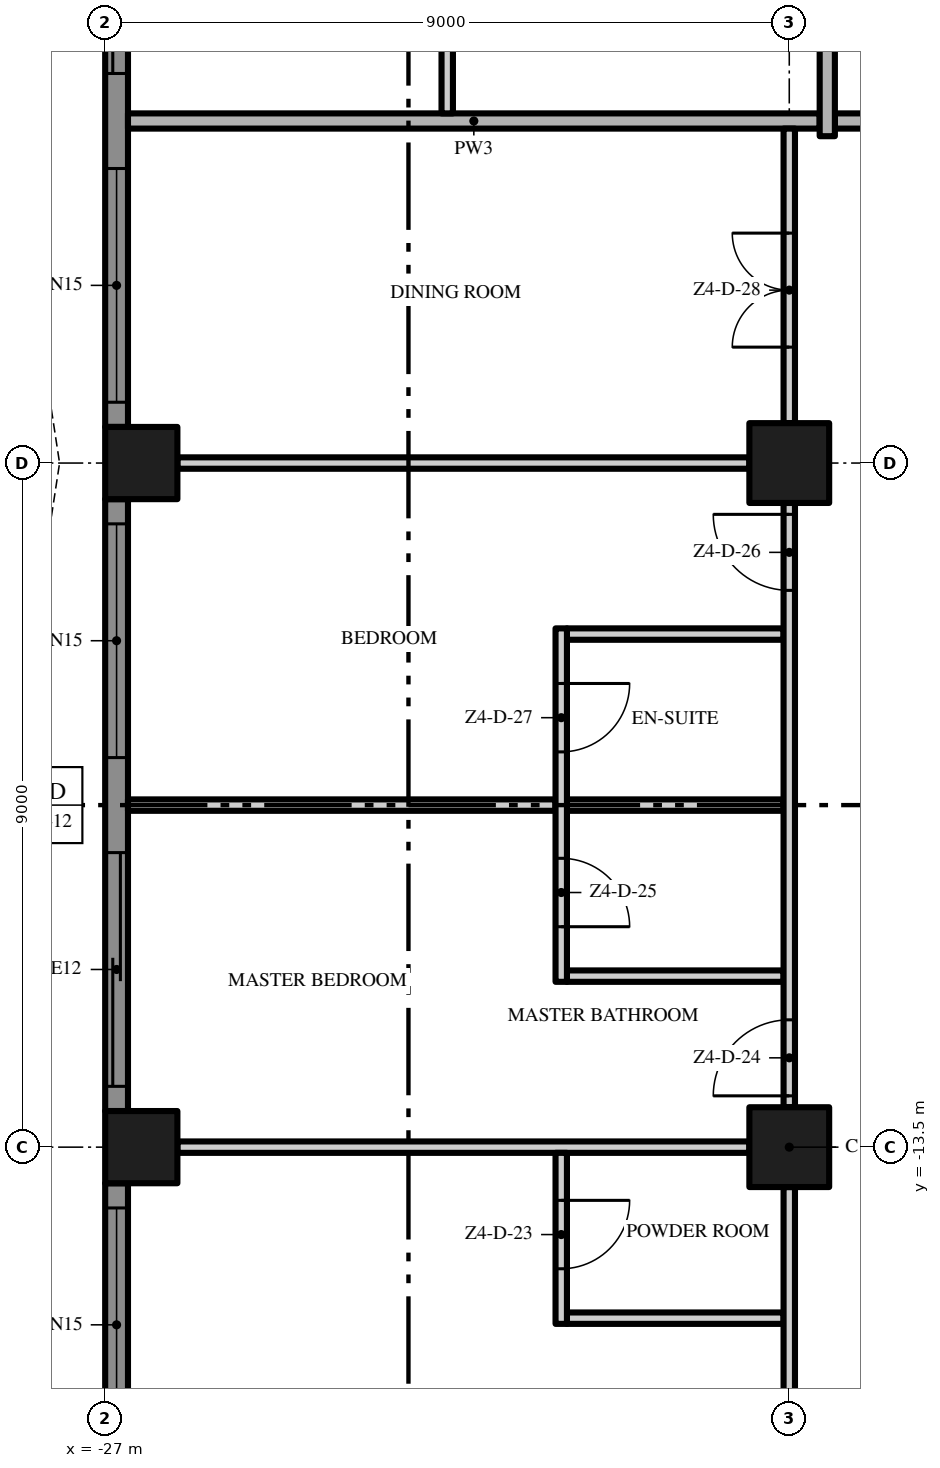
"""IFC4 building model, lengths in metres.
Left out: names, types, materials, properties, quantities, classifications, styles, units other than length and angle.
Written with IfcOpenShell. Run it as: python <this file> out.ifc"""

import sys

from ifc_helpers import new_model, si_unit, direction, frame, frame_2d, origin, origin_2d, place, context, subcontext, project, spatial, polyline, rectangle, outline, extrude, element, fill, save


model = new_model("IFC4")
c1 = context("Model", 3, precision=1e-05, world=origin(), true_north=direction((0.0, 1.0)))
c2 = subcontext(c1, "Body", "Model", "MODEL_VIEW")
j1 = project(units=[si_unit("LENGTHUNIT", "METRE"), si_unit("PLANEANGLEUNIT", "RADIAN")], contexts=[c1])
p1 = place(None, origin())
s1 = spatial("IfcSite", under=j1, at=p1, CompositionType="ELEMENT")
p2 = place(p1, origin())
s2 = spatial("IfcBuilding", under=s1, at=p2, CompositionType="ELEMENT")
p3 = place(p2, frame((0.0, 0.0, 218.6)))
s3 = spatial("IfcBuildingStorey", under=s2, at=p3, CompositionType="ELEMENT", Elevation=218.6)
for number, where, z_axis, x_axis in (
    (1, (-18.0, -13.5, 0.0), (0.0, 0.0, 1.0), (1.0, 0.0, 0.0)),
    (2, (-18.0, -4.5, 0.0), (0.0, 0.0, 1.0), (1.0, 0.0, 0.0)),
):
    element("IfcColumn", number, at=place(p3, frame(where, z_axis=z_axis, x_axis=x_axis)), inside=s3, PredefinedType="COLUMN", context=c2, shape_type="SweptSolid", body=[
        extrude(rectangle(XDim=1.05, YDim=1.05, at=origin_2d()), origin(), (0.0, 0.0, 1.0), 3.5),
    ])
for number, where, z_axis, x_axis in (
    (3, (-26.525, -13.5, 0.0), (0.0, 0.0, 1.0), (1.0, 0.0, 0.0)),
    (4, (-26.525, -4.5, 0.0), (0.0, 0.0, 1.0), (1.0, 0.0, 0.0)),
):
    element("IfcColumn", number, at=place(p3, frame(where, z_axis=z_axis, x_axis=x_axis)), inside=s3, PredefinedType="COLUMN", context=c2, shape_type="SweptSolid", body=[
        extrude(rectangle(XDim=0.95, YDim=0.95, at=origin_2d()), origin(), (0.0, 0.0, 1.0), 3.5),
    ])
p4 = place(p3, frame((-26.85, -4.025, 0.0), z_axis=(0.0, 0.0, 1.0), x_axis=(0.0, 1.0, 0.0)))
e5 = element("IfcWall", 5, at=p4, inside=s3, PredefinedType="SOLIDWALL", context=c2, shape_type="SweptSolid", body=[
    extrude(rectangle(XDim=8.05, YDim=0.3, at=frame_2d((4.025, 0.0))), origin(), (0.0, 0.0, 1.0), 3.5),
])
p5 = place(p4, frame((4.65, 0.0, 0.0)))
e6 = element("IfcOpeningElement", 6, at=p5, cuts=e5, PredefinedType="OPENING", context=c2, shape_type="SweptSolid", body=[
    extrude(rectangle(XDim=3.075, YDim=2.4, at=frame_2d((1.538, 1.2))), frame((0.0, 0.16, 0.0), z_axis=(0.0, -1.0, 0.0), x_axis=(1.0, 0.0, 0.0)), (0.0, 0.0, 1.0), 0.32),
])
p6 = place(p4, frame((0.325, 0.0, 0.45)))
e7 = element("IfcOpeningElement", 7, at=p6, cuts=e5, PredefinedType="OPENING", context=c2, shape_type="SweptSolid", body=[
    extrude(rectangle(XDim=3.075, YDim=2.65, at=frame_2d((1.538, 1.325))), frame((0.0, 0.16, 0.0), z_axis=(0.0, -1.0, 0.0), x_axis=(1.0, 0.0, 0.0)), (0.0, 0.0, 1.0), 0.32),
])
p7 = place(p3, frame((-26.85, -13.025, 0.0), z_axis=(0.0, 0.0, 1.0), x_axis=(0.0, 1.0, 0.0)))
e8 = element("IfcWall", 8, at=p7, inside=s3, PredefinedType="SOLIDWALL", context=c2, shape_type="SweptSolid", body=[
    extrude(rectangle(XDim=8.05, YDim=0.3, at=frame_2d((4.025, 0.0))), origin(), (0.0, 0.0, 1.0), 3.5),
])
p8 = place(p7, frame((4.65, 0.0, 0.45)))
e9 = element("IfcOpeningElement", 9, at=p8, cuts=e8, PredefinedType="OPENING", context=c2, shape_type="SweptSolid", body=[
    extrude(rectangle(XDim=3.075, YDim=2.65, at=frame_2d((1.538, 1.325))), frame((0.0, 0.16, 0.0), z_axis=(0.0, -1.0, 0.0), x_axis=(1.0, 0.0, 0.0)), (0.0, 0.0, 1.0), 0.32),
])
p9 = place(p7, frame((0.325, 0.0, 0.0)))
e10 = element("IfcOpeningElement", 10, at=p9, cuts=e8, PredefinedType="OPENING", context=c2, shape_type="SweptSolid", body=[
    extrude(rectangle(XDim=3.075, YDim=2.4, at=frame_2d((1.538, 1.2))), frame((0.0, 0.16, 0.0), z_axis=(0.0, -1.0, 0.0), x_axis=(1.0, 0.0, 0.0)), (0.0, 0.0, 1.0), 0.32),
])
p10 = place(p3, frame((-26.85, -18.0, 0.0), z_axis=(0.0, 0.0, 1.0), x_axis=(0.0, 1.0, 0.0)))
e11 = element("IfcWall", 11, at=p10, inside=s3, PredefinedType="SOLIDWALL", context=c2, shape_type="SweptSolid", body=[
    extrude(rectangle(XDim=4.025, YDim=0.3, at=frame_2d((2.013, 0.0))), origin(), (0.0, 0.0, 1.0), 3.5),
])
p11 = place(p10, frame((0.625, 0.0, 0.45)))
e12 = element("IfcOpeningElement", 12, at=p11, cuts=e11, PredefinedType="OPENING", context=c2, shape_type="SweptSolid", body=[
    extrude(rectangle(XDim=3.075, YDim=2.65, at=frame_2d((1.538, 1.325))), frame((0.0, 0.16, 0.0), z_axis=(0.0, -1.0, 0.0), x_axis=(1.0, 0.0, 0.0)), (0.0, 0.0, 1.0), 0.32),
])
p12 = place(p3, origin())
e13 = element("IfcWall", 13, at=p12, inside=s3, PredefinedType="USERDEFINED", context=c2, shape_type="SweptSolid", body=[
    extrude(outline(polyline([(-30.0, 18.0), (-29.771, 16.5), (-29.171, 15.0), (-28.429, 13.5), (-27.829, 12.0), (-27.6, 10.5), (-27.829, 9.0), (-28.429, 7.5), (-29.171, 6.0), (-29.771, 4.5), (-30.0, 3.0), (-29.771, 1.5), (-29.171, 0.0), (-28.429, -1.5), (-27.829, -3.0), (-27.6, -4.5), (-27.829, -6.0), (-28.429, -7.5), (-29.171, -9.0), (-29.771, -10.5), (-30.0, -12.0), (-29.771, -13.5), (-29.171, -15.0), (-28.429, -16.5), (-27.829, -18.0), (-27.597, -17.907), (-28.201, -16.398), (-28.942, -14.898), (-29.528, -13.434), (-29.747, -12.0), (-29.528, -10.566), (-28.942, -9.102), (-28.201, -7.602), (-27.586, -6.066), (-27.347, -4.5), (-27.586, -2.934), (-28.201, -1.398), (-28.942, 0.102), (-29.528, 1.566), (-29.747, 3.0), (-29.528, 4.434), (-28.942, 5.898), (-28.201, 7.398), (-27.586, 8.934), (-27.347, 10.5), (-27.586, 12.066), (-28.201, 13.602), (-28.942, 15.102), (-29.528, 16.566), (-29.753, 18.038), (-30.0, 18.0)])), origin(), (0.0, 0.0, 1.0), 0.9),
])
p13 = place(p3, frame((-20.925, -15.75, 0.0), z_axis=(0.0, 0.0, 1.0), x_axis=(1.0, 0.0, 0.0)))
e14 = element("IfcWall", 14, at=p13, inside=s3, PredefinedType="PARTITIONING", context=c2, shape_type="SweptSolid", body=[
    extrude(rectangle(XDim=2.85, YDim=0.15, at=frame_2d((1.425, 0.0))), origin(), (0.0, 0.0, 1.0), 3.5),
])
p14 = place(p3, frame((-26.05, -13.5, 0.0), z_axis=(0.0, 0.0, 1.0), x_axis=(1.0, 0.0, 0.0)))
e15 = element("IfcWall", 15, at=p14, inside=s3, PredefinedType="PARTITIONING", context=c2, shape_type="SweptSolid", body=[
    extrude(rectangle(XDim=7.525, YDim=0.15, at=frame_2d((3.763, 0.0))), origin(), (0.0, 0.0, 1.0), 3.5),
])
p15 = place(p3, frame((-20.925, -11.25, 0.0), z_axis=(0.0, 0.0, 1.0), x_axis=(1.0, 0.0, 0.0)))
e16 = element("IfcWall", 16, at=p15, inside=s3, PredefinedType="PARTITIONING", context=c2, shape_type="SweptSolid", body=[
    extrude(rectangle(XDim=2.85, YDim=0.15, at=frame_2d((1.425, 0.0))), origin(), (0.0, 0.0, 1.0), 3.5),
])
p16 = place(p3, frame((-26.7, -9.0, 0.0), z_axis=(0.0, 0.0, 1.0), x_axis=(1.0, 0.0, 0.0)))
e17 = element("IfcWall", 17, at=p16, inside=s3, PredefinedType="PARTITIONING", context=c2, shape_type="SweptSolid", body=[
    extrude(rectangle(XDim=5.625, YDim=0.15, at=frame_2d((2.812, 0.0))), origin(), (0.0, 0.0, 1.0), 3.5),
])
for number, where, z_axis, x_axis in (
    (18, (-20.925, -9.0, 0.0), (0.0, 0.0, 1.0), (1.0, 0.0, 0.0)),
    (19, (-20.925, -6.75, 0.0), (0.0, 0.0, 1.0), (1.0, 0.0, 0.0)),
):
    element("IfcWall", number, at=place(p3, frame(where, z_axis=z_axis, x_axis=x_axis)), inside=s3, PredefinedType="PARTITIONING", context=c2, shape_type="SweptSolid", body=[
        extrude(rectangle(XDim=2.85, YDim=0.15, at=frame_2d((1.425, 0.0))), origin(), (0.0, 0.0, 1.0), 3.5),
    ])
p17 = place(p3, frame((-26.05, -4.5, 0.0), z_axis=(0.0, 0.0, 1.0), x_axis=(1.0, 0.0, 0.0)))
e20 = element("IfcWall", 20, at=p17, inside=s3, PredefinedType="PARTITIONING", context=c2, shape_type="SweptSolid", body=[
    extrude(rectangle(XDim=7.525, YDim=0.15, at=frame_2d((3.763, 0.0))), origin(), (0.0, 0.0, 1.0), 3.5),
])
p18 = place(p3, frame((-17.4, 0.0, 0.0), z_axis=(0.0, 0.0, 1.0), x_axis=(1.0, 0.0, 0.0)))
e21 = element("IfcWall", 21, at=p18, inside=s3, PredefinedType="PARTITIONING", context=c2, shape_type="SweptSolid", body=[
    extrude(rectangle(XDim=12.8, YDim=0.2, at=frame_2d((6.4, 0.0))), origin(), (0.0, 0.0, 1.0), 3.5),
])
p19 = place(p3, frame((-26.7, 0.0, 0.0), z_axis=(0.0, 0.0, 1.0), x_axis=(1.0, 0.0, 0.0)))
e22 = element("IfcWall", 22, at=p19, inside=s3, PredefinedType="PARTITIONING", context=c2, shape_type="SweptSolid", body=[
    extrude(rectangle(XDim=9.1, YDim=0.2, at=frame_2d((4.55, 0.0))), origin(), (0.0, 0.0, 1.0), 3.5),
])
p20 = place(p3, frame((-22.5, 0.1, 0.0), z_axis=(0.0, 0.0, 1.0), x_axis=(0.0, 1.0, 0.0)))
e23 = element("IfcWall", 23, at=p20, inside=s3, PredefinedType="PARTITIONING", context=c2, shape_type="SweptSolid", body=[
    extrude(rectangle(XDim=17.425, YDim=0.15, at=frame_2d((8.713, 0.0))), origin(), (0.0, 0.0, 1.0), 3.5),
])
p21 = place(p20, frame((1.65, 0.0, 0.0)))
e24 = element("IfcOpeningElement", 24, at=p21, cuts=e23, PredefinedType="OPENING", context=c2, shape_type="SweptSolid", body=[
    extrude(rectangle(XDim=1.0, YDim=2.4, at=frame_2d((0.5, 1.2))), frame((0.0, 0.085, 0.0), z_axis=(0.0, -1.0, 0.0), x_axis=(1.0, 0.0, 0.0)), (0.0, 0.0, 1.0), 0.17),
])
p22 = place(p20, frame((7.25, 0.0, 0.0)))
e25 = element("IfcOpeningElement", 25, at=p22, cuts=e23, PredefinedType="OPENING", context=c2, shape_type="SweptSolid", body=[
    extrude(rectangle(XDim=1.0, YDim=2.4, at=frame_2d((0.5, 1.2))), frame((0.0, 0.085, 0.0), z_axis=(0.0, -1.0, 0.0), x_axis=(1.0, 0.0, 0.0)), (0.0, 0.0, 1.0), 0.17),
])
p23 = place(p20, frame((11.4, 0.0, 0.0)))
e26 = element("IfcOpeningElement", 26, at=p23, cuts=e23, PredefinedType="OPENING", context=c2, shape_type="SweptSolid", body=[
    extrude(rectangle(XDim=1.8, YDim=2.4, at=frame_2d((0.9, 1.2))), frame((0.0, 0.085, 0.0), z_axis=(0.0, -1.0, 0.0), x_axis=(1.0, 0.0, 0.0)), (0.0, 0.0, 1.0), 0.17),
])
p24 = place(p3, frame((-21.0, -13.575, 0.0), z_axis=(0.0, 0.0, 1.0), x_axis=(0.0, -1.0, 0.0)))
e27 = element("IfcWall", 27, at=p24, inside=s3, PredefinedType="PARTITIONING", context=c2, shape_type="SweptSolid", body=[
    extrude(rectangle(XDim=2.25, YDim=0.15, at=frame_2d((1.125, 0.0))), origin(), (0.0, 0.0, 1.0), 3.5),
])
p25 = place(p24, frame((0.625, 0.0, 0.0)))
e28 = element("IfcOpeningElement", 28, at=p25, cuts=e27, PredefinedType="OPENING", context=c2, shape_type="SweptSolid", body=[
    extrude(rectangle(XDim=0.9, YDim=2.1, at=frame_2d((0.45, 1.05))), frame((0.0, 0.085, 0.0), z_axis=(0.0, -1.0, 0.0), x_axis=(1.0, 0.0, 0.0)), (0.0, 0.0, 1.0), 0.17),
])
p26 = place(p3, frame((-21.0, -6.675, 0.0), z_axis=(0.0, 0.0, 1.0), x_axis=(0.0, -1.0, 0.0)))
e29 = element("IfcWall", 29, at=p26, inside=s3, PredefinedType="PARTITIONING", context=c2, shape_type="SweptSolid", body=[
    extrude(rectangle(XDim=4.65, YDim=0.15, at=frame_2d((2.325, 0.0))), origin(), (0.0, 0.0, 1.0), 3.5),
])
p27 = place(p26, frame((3.025, 0.0, 0.0)))
e30 = element("IfcOpeningElement", 30, at=p27, cuts=e29, PredefinedType="OPENING", context=c2, shape_type="SweptSolid", body=[
    extrude(rectangle(XDim=0.9, YDim=2.1, at=frame_2d((0.45, 1.05))), frame((0.0, 0.085, 0.0), z_axis=(0.0, -1.0, 0.0), x_axis=(1.0, 0.0, 0.0)), (0.0, 0.0, 1.0), 0.17),
])
p28 = place(p26, frame((0.725, 0.0, 0.0)))
e31 = element("IfcOpeningElement", 31, at=p28, cuts=e29, PredefinedType="OPENING", context=c2, shape_type="SweptSolid", body=[
    extrude(rectangle(XDim=0.9, YDim=2.1, at=frame_2d((0.45, 1.05))), frame((0.0, 0.085, 0.0), z_axis=(0.0, -1.0, 0.0), x_axis=(1.0, 0.0, 0.0)), (0.0, 0.0, 1.0), 0.17),
])
p29 = place(p3, frame((-18.0, -21.55, 0.0), z_axis=(0.0, 0.0, 1.0), x_axis=(0.0, 1.0, 0.0)))
e32 = element("IfcWall", 32, at=p29, inside=s3, PredefinedType="PARTITIONING", context=c2, shape_type="SweptSolid", body=[
    extrude(rectangle(XDim=7.525, YDim=0.15, at=frame_2d((3.763, 0.0))), origin(), (0.0, 0.0, 1.0), 3.5),
])
p30 = place(p29, frame((1.5, 0.0, 0.0)))
e33 = element("IfcOpeningElement", 33, at=p30, cuts=e32, PredefinedType="OPENING", context=c2, shape_type="SweptSolid", body=[
    extrude(rectangle(XDim=1.8, YDim=2.4, at=frame_2d((0.9, 1.2))), frame((0.0, 0.085, 0.0), z_axis=(0.0, -1.0, 0.0), x_axis=(1.0, 0.0, 0.0)), (0.0, 0.0, 1.0), 0.17),
])
p31 = place(p3, frame((-18.0, -12.975, 0.0), z_axis=(0.0, 0.0, 1.0), x_axis=(0.0, 1.0, 0.0)))
e34 = element("IfcWall", 34, at=p31, inside=s3, PredefinedType="PARTITIONING", context=c2, shape_type="SweptSolid", body=[
    extrude(rectangle(XDim=7.95, YDim=0.15, at=frame_2d((3.975, 0.0))), origin(), (0.0, 0.0, 1.0), 3.5),
])
p32 = place(p31, frame((0.15, 0.0, 0.0)))
e35 = element("IfcOpeningElement", 35, at=p32, cuts=e34, PredefinedType="OPENING", context=c2, shape_type="SweptSolid", body=[
    extrude(rectangle(XDim=1.0, YDim=2.4, at=frame_2d((0.5, 1.2))), frame((0.0, 0.085, 0.0), z_axis=(0.0, -1.0, 0.0), x_axis=(1.0, 0.0, 0.0)), (0.0, 0.0, 1.0), 0.17),
])
p33 = place(p31, frame((6.8, 0.0, 0.0)))
e36 = element("IfcOpeningElement", 36, at=p33, cuts=e34, PredefinedType="OPENING", context=c2, shape_type="SweptSolid", body=[
    extrude(rectangle(XDim=1.0, YDim=2.4, at=frame_2d((0.5, 1.2))), frame((0.0, 0.085, 0.0), z_axis=(0.0, -1.0, 0.0), x_axis=(1.0, 0.0, 0.0)), (0.0, 0.0, 1.0), 0.17),
])
p34 = place(p3, frame((-18.0, -3.975, 0.0), z_axis=(0.0, 0.0, 1.0), x_axis=(0.0, 1.0, 0.0)))
e37 = element("IfcWall", 37, at=p34, inside=s3, PredefinedType="PARTITIONING", context=c2, shape_type="SweptSolid", body=[
    extrude(rectangle(XDim=3.875, YDim=0.15, at=frame_2d((1.938, 0.0))), origin(), (0.0, 0.0, 1.0), 3.5),
])
p35 = place(p34, frame((1.0, 0.0, 0.0)))
e38 = element("IfcOpeningElement", 38, at=p35, cuts=e37, PredefinedType="OPENING", context=c2, shape_type="SweptSolid", body=[
    extrude(rectangle(XDim=1.5, YDim=2.4, at=frame_2d((0.75, 1.2))), frame((0.0, 0.085, 0.0), z_axis=(0.0, -1.0, 0.0), x_axis=(1.0, 0.0, 0.0)), (0.0, 0.0, 1.0), 0.17),
])
p36 = place(p3, frame((-17.5, -0.2, 0.0), z_axis=(0.0, 0.0, 1.0), x_axis=(0.0, 1.0, 0.0)))
e39 = element("IfcWall", 39, at=p36, inside=s3, PredefinedType="PARTITIONING", context=c2, shape_type="SweptSolid", body=[
    extrude(rectangle(XDim=4.175, YDim=0.2, at=frame_2d((2.087, 0.0))), origin(), (0.0, 0.0, 1.0), 3.5),
])
p37 = place(p5, origin())
e40 = element("IfcDoor", 40, at=p37, inside=s3, OperationType="SINGLE_SWING_LEFT", PredefinedType="DOOR", context=c2, shape_type="SweptSolid", body=[
    extrude(rectangle(XDim=3.075, YDim=2.4, at=frame_2d((1.538, 1.2))), frame((0.0, 0.025, 0.0), z_axis=(0.0, -1.0, 0.0), x_axis=(1.0, 0.0, 0.0)), (0.0, 0.0, 1.0), 0.05),
])
fill(e6, e40)
p38 = place(p6, origin())
e41 = element("IfcWindow", 41, at=p38, inside=s3, PartitioningType="SINGLE_PANEL", PredefinedType="WINDOW", context=c2, shape_type="SweptSolid", body=[
    extrude(rectangle(XDim=3.075, YDim=2.65, at=frame_2d((1.538, 1.325))), frame((0.0, 0.03, 0.0), z_axis=(0.0, -1.0, 0.0), x_axis=(1.0, 0.0, 0.0)), (0.0, 0.0, 1.0), 0.06),
])
fill(e7, e41)
p39 = place(p8, origin())
e42 = element("IfcWindow", 42, at=p39, inside=s3, PartitioningType="SINGLE_PANEL", PredefinedType="WINDOW", context=c2, shape_type="SweptSolid", body=[
    extrude(rectangle(XDim=3.075, YDim=2.65, at=frame_2d((1.538, 1.325))), frame((0.0, 0.03, 0.0), z_axis=(0.0, -1.0, 0.0), x_axis=(1.0, 0.0, 0.0)), (0.0, 0.0, 1.0), 0.06),
])
fill(e9, e42)
p40 = place(p9, origin())
e43 = element("IfcDoor", 43, at=p40, inside=s3, OperationType="SINGLE_SWING_LEFT", PredefinedType="DOOR", context=c2, shape_type="SweptSolid", body=[
    extrude(rectangle(XDim=3.075, YDim=2.4, at=frame_2d((1.538, 1.2))), frame((0.0, 0.025, 0.0), z_axis=(0.0, -1.0, 0.0), x_axis=(1.0, 0.0, 0.0)), (0.0, 0.0, 1.0), 0.05),
])
fill(e10, e43)
p41 = place(p11, origin())
e44 = element("IfcWindow", 44, at=p41, inside=s3, PartitioningType="SINGLE_PANEL", PredefinedType="WINDOW", context=c2, shape_type="SweptSolid", body=[
    extrude(rectangle(XDim=3.075, YDim=2.65, at=frame_2d((1.538, 1.325))), frame((0.0, 0.03, 0.0), z_axis=(0.0, -1.0, 0.0), x_axis=(1.0, 0.0, 0.0)), (0.0, 0.0, 1.0), 0.06),
])
fill(e12, e44)
p42 = place(p25, origin())
e45 = element("IfcDoor", 45, at=p42, inside=s3, OperationType="SINGLE_SWING_LEFT", PredefinedType="DOOR", context=c2, shape_type="SweptSolid", body=[
    extrude(rectangle(XDim=0.9, YDim=2.1, at=frame_2d((0.45, 1.05))), frame((0.0, 0.025, 0.0), z_axis=(0.0, -1.0, 0.0), x_axis=(1.0, 0.0, 0.0)), (0.0, 0.0, 1.0), 0.05),
])
fill(e28, e45)
p43 = place(p32, origin())
e46 = element("IfcDoor", 46, at=p43, inside=s3, OperationType="SINGLE_SWING_LEFT", PredefinedType="DOOR", context=c2, shape_type="SweptSolid", body=[
    extrude(rectangle(XDim=1.0, YDim=2.4, at=frame_2d((0.5, 1.2))), frame((0.0, 0.025, 0.0), z_axis=(0.0, -1.0, 0.0), x_axis=(1.0, 0.0, 0.0)), (0.0, 0.0, 1.0), 0.05),
])
fill(e35, e46)
p44 = place(p27, origin())
e47 = element("IfcDoor", 47, at=p44, inside=s3, OperationType="SINGLE_SWING_RIGHT", PredefinedType="DOOR", context=c2, shape_type="SweptSolid", body=[
    extrude(rectangle(XDim=0.9, YDim=2.1, at=frame_2d((0.45, 1.05))), frame((0.0, 0.025, 0.0), z_axis=(0.0, -1.0, 0.0), x_axis=(1.0, 0.0, 0.0)), (0.0, 0.0, 1.0), 0.05),
])
fill(e30, e47)
p45 = place(p33, origin())
e48 = element("IfcDoor", 48, at=p45, inside=s3, OperationType="SINGLE_SWING_RIGHT", PredefinedType="DOOR", context=c2, shape_type="SweptSolid", body=[
    extrude(rectangle(XDim=1.0, YDim=2.4, at=frame_2d((0.5, 1.2))), frame((0.0, 0.025, 0.0), z_axis=(0.0, -1.0, 0.0), x_axis=(1.0, 0.0, 0.0)), (0.0, 0.0, 1.0), 0.05),
])
fill(e36, e48)
p46 = place(p28, origin())
e49 = element("IfcDoor", 49, at=p46, inside=s3, OperationType="SINGLE_SWING_LEFT", PredefinedType="DOOR", context=c2, shape_type="SweptSolid", body=[
    extrude(rectangle(XDim=0.9, YDim=2.1, at=frame_2d((0.45, 1.05))), frame((0.0, 0.025, 0.0), z_axis=(0.0, -1.0, 0.0), x_axis=(1.0, 0.0, 0.0)), (0.0, 0.0, 1.0), 0.05),
])
fill(e31, e49)
p47 = place(p35, origin())
e50 = element("IfcDoor", 50, at=p47, inside=s3, OperationType="DOUBLE_DOOR_SINGLE_SWING", PredefinedType="DOOR", context=c2, shape_type="SweptSolid", body=[
    extrude(rectangle(XDim=1.5, YDim=2.4, at=frame_2d((0.75, 1.2))), frame((0.0, 0.025, 0.0), z_axis=(0.0, -1.0, 0.0), x_axis=(1.0, 0.0, 0.0)), (0.0, 0.0, 1.0), 0.05),
])
fill(e38, e50)
save(model, sys.argv[1])
